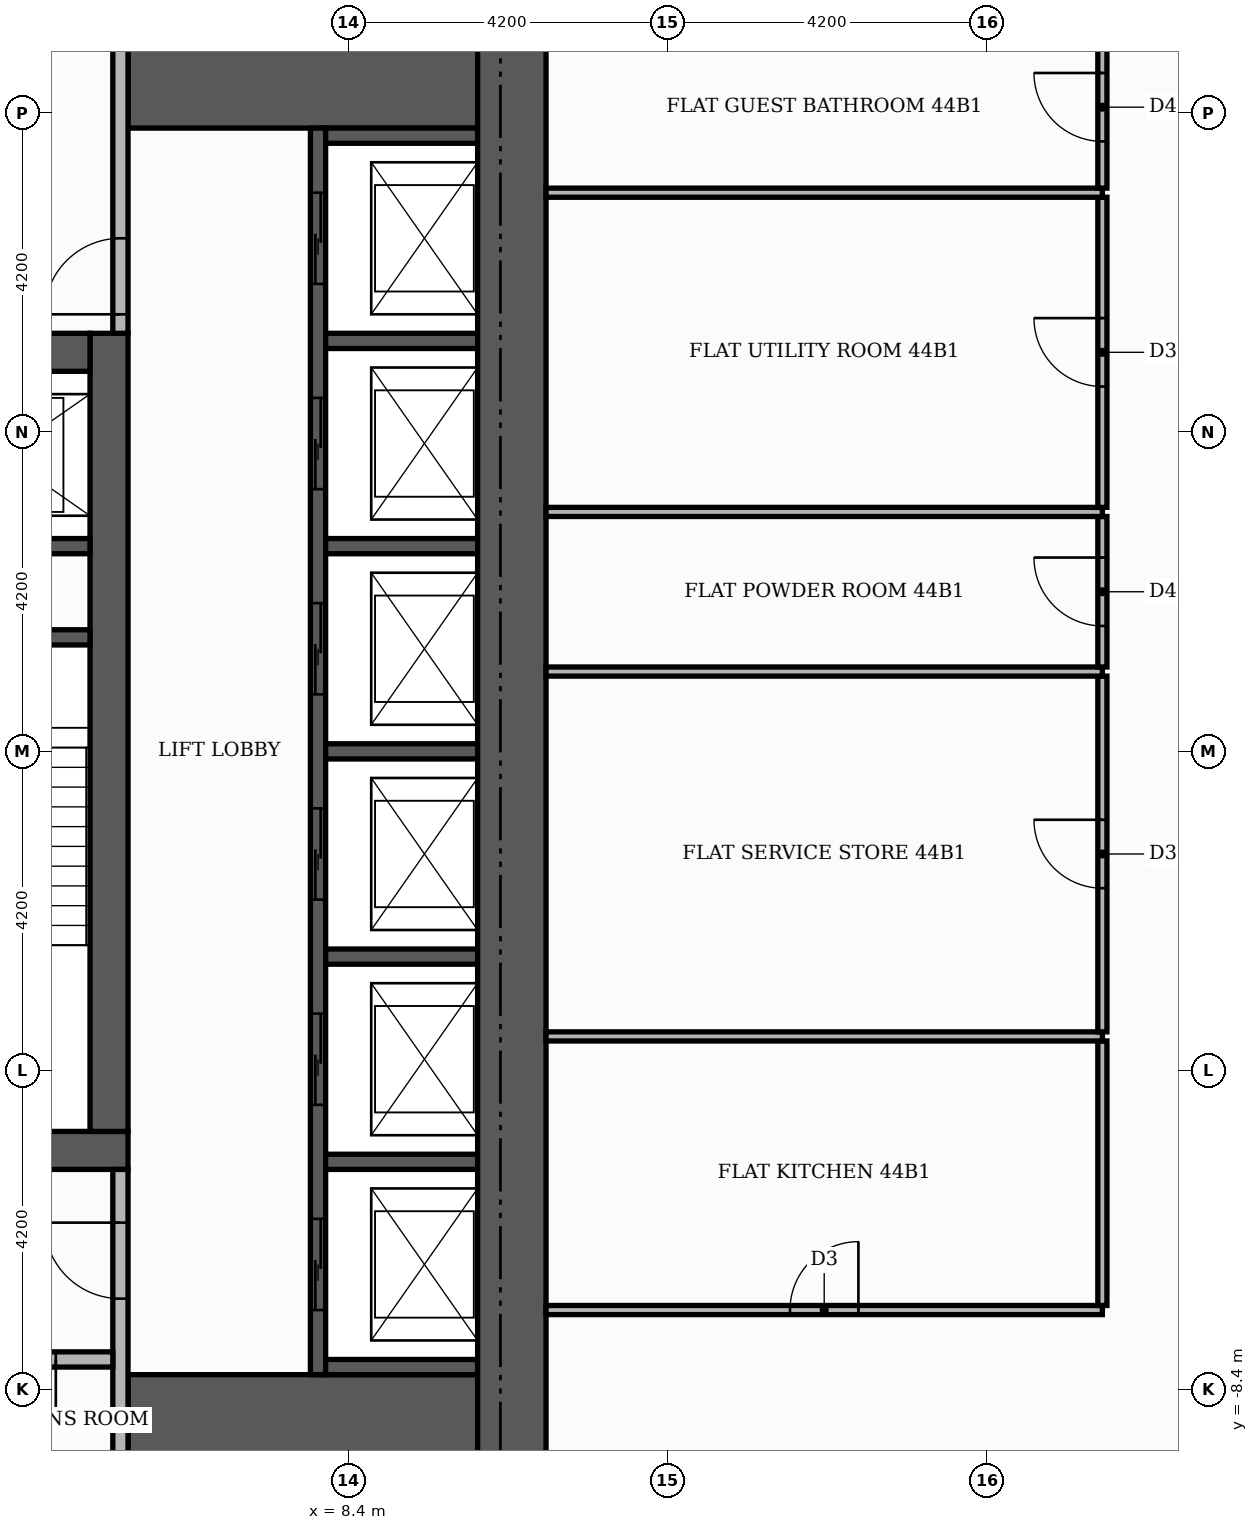
"""IFC4 building model, lengths in metres.
Left out: names, types, materials, properties, quantities, classifications, styles, units other than length and angle.
Written with IfcOpenShell. Run it as: python <this file> out.ifc"""

import sys

from ifc_helpers import new_model, si_unit, direction, frame, frame_2d, origin, place, context, subcontext, project, spatial, rectangle, extrude, element, fill, save


model = new_model("IFC4")
c1 = context("Model", 3, precision=1e-05, world=origin(), true_north=direction((0.0, 1.0)))
c2 = subcontext(c1, "Body", "Model", "MODEL_VIEW")
j1 = project(units=[si_unit("LENGTHUNIT", "METRE"), si_unit("PLANEANGLEUNIT", "RADIAN")], contexts=[c1])
p1 = place(None, origin())
s1 = spatial("IfcSite", under=j1, at=p1, CompositionType="ELEMENT")
p2 = place(p1, origin())
s2 = spatial("IfcBuilding", under=s1, at=p2, CompositionType="ELEMENT")
p3 = place(p2, frame((0.0, 0.0, 188.4)))
s3 = spatial("IfcBuildingStorey", under=s2, at=p3, CompositionType="ELEMENT", Elevation=188.4)
p4 = place(p3, frame((-5.5, -5.25, 0.0), z_axis=(0.0, 0.0, 1.0), x_axis=(1.0, 0.0, 0.0)))
e1 = element("IfcWall", 1, at=p4, inside=s3, PredefinedType="SHEAR", context=c2, shape_type="SweptSolid", body=[
    extrude(rectangle(XDim=11.0, YDim=0.5, at=frame_2d((5.5, 0.0))), origin(), (0.0, 0.0, 1.0), 3.48),
])
p5 = place(p4, frame((4.9, 0.0, 0.0)))
e2 = element("IfcOpeningElement", 2, at=p5, cuts=e1, PredefinedType="OPENING", context=c2, shape_type="SweptSolid", body=[
    extrude(rectangle(XDim=1.2, YDim=2.1, at=frame_2d((0.6, 1.05))), frame((0.0, 0.26, 0.0), z_axis=(0.0, -1.0, 0.0), x_axis=(1.0, 0.0, 0.0)), (0.0, 0.0, 1.0), 0.52),
])
p6 = place(p3, frame((5.25, -5.0, 0.0), z_axis=(0.0, 0.0, 1.0), x_axis=(0.0, 1.0, 0.0)))
e3 = element("IfcWall", 3, at=p6, inside=s3, PredefinedType="SHEAR", context=c2, shape_type="SweptSolid", body=[
    extrude(rectangle(XDim=10.5, YDim=0.5, at=frame_2d((5.25, 0.0))), origin(), (0.0, 0.0, 1.0), 3.48),
])
p7 = place(p3, frame((-5.0, 5.25, 0.0), z_axis=(0.0, 0.0, 1.0), x_axis=(1.0, 0.0, 0.0)))
e4 = element("IfcWall", 4, at=p7, inside=s3, PredefinedType="SHEAR", context=c2, shape_type="SweptSolid", body=[
    extrude(rectangle(XDim=10.0, YDim=0.5, at=frame_2d((5.0, 0.0))), origin(), (0.0, 0.0, 1.0), 3.48),
])
p8 = place(p7, frame((4.4, 0.0, 0.0)))
e5 = element("IfcOpeningElement", 5, at=p8, cuts=e4, PredefinedType="OPENING", context=c2, shape_type="SweptSolid", body=[
    extrude(rectangle(XDim=1.2, YDim=2.1, at=frame_2d((0.6, 1.05))), frame((0.0, 0.26, 0.0), z_axis=(0.0, -1.0, 0.0), x_axis=(1.0, 0.0, 0.0)), (0.0, 0.0, 1.0), 0.52),
])
for number, where, z_axis, x_axis in (
    (6, (5.5, -9.15, 0.0), (0.0, 0.0, 1.0), (1.0, 0.0, 0.0)),
    (7, (5.5, 9.15, 0.0), (0.0, 0.0, 1.0), (1.0, 0.0, 0.0)),
):
    element("IfcWall", number, at=place(p3, frame(where, z_axis=z_axis, x_axis=x_axis)), inside=s3, PredefinedType="SHEAR", context=c2, shape_type="SweptSolid", body=[
        extrude(rectangle(XDim=4.6, YDim=1.9, at=frame_2d((2.3, 0.0))), origin(), (0.0, 0.0, 1.0), 3.48),
    ])
p9 = place(p3, frame((2.15, 1.5, 0.0), z_axis=(0.0, 0.0, 1.0), x_axis=(1.0, 0.0, 0.0)))
e8 = element("IfcWall", 8, at=p9, inside=s3, PredefinedType="SHEAR", context=c2, shape_type="SweptSolid", body=[
    extrude(rectangle(XDim=2.85, YDim=0.2, at=frame_2d((1.425, 0.0))), origin(), (0.0, 0.0, 1.0), 3.48),
])
p10 = place(p3, frame((8.0, -8.2, 0.0), z_axis=(0.0, 0.0, 1.0), x_axis=(0.0, 1.0, 0.0)))
e9 = element("IfcWall", 9, at=p10, inside=s3, PredefinedType="SHEAR", context=c2, shape_type="SweptSolid", body=[
    extrude(rectangle(XDim=16.4, YDim=0.2, at=frame_2d((8.2, 0.0))), origin(), (0.0, 0.0, 1.0), 3.48),
])
p11 = place(p10, frame((0.85, 0.0, 0.0)))
e10 = element("IfcOpeningElement", 10, at=p11, cuts=e9, PredefinedType="OPENING", context=c2, shape_type="SweptSolid", body=[
    extrude(rectangle(XDim=1.2, YDim=2.1, at=frame_2d((0.6, 1.05))), frame((0.0, 0.11, 0.0), z_axis=(0.0, -1.0, 0.0), x_axis=(1.0, 0.0, 0.0)), (0.0, 0.0, 1.0), 0.22),
])
p12 = place(p10, frame((3.55, 0.0, 0.0)))
e11 = element("IfcOpeningElement", 11, at=p12, cuts=e9, PredefinedType="OPENING", context=c2, shape_type="SweptSolid", body=[
    extrude(rectangle(XDim=1.2, YDim=2.1, at=frame_2d((0.6, 1.05))), frame((0.0, 0.11, 0.0), z_axis=(0.0, -1.0, 0.0), x_axis=(1.0, 0.0, 0.0)), (0.0, 0.0, 1.0), 0.22),
])
p13 = place(p10, frame((6.25, 0.0, 0.0)))
e12 = element("IfcOpeningElement", 12, at=p13, cuts=e9, PredefinedType="OPENING", context=c2, shape_type="SweptSolid", body=[
    extrude(rectangle(XDim=1.2, YDim=2.1, at=frame_2d((0.6, 1.05))), frame((0.0, 0.11, 0.0), z_axis=(0.0, -1.0, 0.0), x_axis=(1.0, 0.0, 0.0)), (0.0, 0.0, 1.0), 0.22),
])
p14 = place(p10, frame((8.95, 0.0, 0.0)))
e13 = element("IfcOpeningElement", 13, at=p14, cuts=e9, PredefinedType="OPENING", context=c2, shape_type="SweptSolid", body=[
    extrude(rectangle(XDim=1.2, YDim=2.1, at=frame_2d((0.6, 1.05))), frame((0.0, 0.11, 0.0), z_axis=(0.0, -1.0, 0.0), x_axis=(1.0, 0.0, 0.0)), (0.0, 0.0, 1.0), 0.22),
])
p15 = place(p10, frame((11.65, 0.0, 0.0)))
e14 = element("IfcOpeningElement", 14, at=p15, cuts=e9, PredefinedType="OPENING", context=c2, shape_type="SweptSolid", body=[
    extrude(rectangle(XDim=1.2, YDim=2.1, at=frame_2d((0.6, 1.05))), frame((0.0, 0.11, 0.0), z_axis=(0.0, -1.0, 0.0), x_axis=(1.0, 0.0, 0.0)), (0.0, 0.0, 1.0), 0.22),
])
p16 = place(p10, frame((14.35, 0.0, 0.0)))
e15 = element("IfcOpeningElement", 15, at=p16, cuts=e9, PredefinedType="OPENING", context=c2, shape_type="SweptSolid", body=[
    extrude(rectangle(XDim=1.2, YDim=2.1, at=frame_2d((0.6, 1.05))), frame((0.0, 0.11, 0.0), z_axis=(0.0, -1.0, 0.0), x_axis=(1.0, 0.0, 0.0)), (0.0, 0.0, 1.0), 0.22),
])
for number, where, z_axis, x_axis in (
    (16, (8.1, -8.1, 0.0), (0.0, 0.0, 1.0), (1.0, 0.0, 0.0)),
    (17, (8.1, -5.4, 0.0), (0.0, 0.0, 1.0), (1.0, 0.0, 0.0)),
    (18, (8.1, -2.7, 0.0), (0.0, 0.0, 1.0), (1.0, 0.0, 0.0)),
    (19, (8.1, 0.0, 0.0), (0.0, 0.0, 1.0), (1.0, 0.0, 0.0)),
):
    element("IfcWall", number, at=place(p3, frame(where, z_axis=z_axis, x_axis=x_axis)), inside=s3, PredefinedType="SHEAR", context=c2, shape_type="SweptSolid", body=[
        extrude(rectangle(XDim=2.0, YDim=0.2, at=frame_2d((1.0, 0.0))), origin(), (0.0, 0.0, 1.0), 3.48),
    ])
p17 = place(p3, frame((2.15, 2.7, 0.0), z_axis=(0.0, 0.0, 1.0), x_axis=(1.0, 0.0, 0.0)))
e20 = element("IfcWall", 20, at=p17, inside=s3, PredefinedType="SHEAR", context=c2, shape_type="SweptSolid", body=[
    extrude(rectangle(XDim=2.85, YDim=0.2, at=frame_2d((1.425, 0.0))), origin(), (0.0, 0.0, 1.0), 3.48),
])
for number, where, z_axis, x_axis in (
    (21, (8.1, 2.7, 0.0), (0.0, 0.0, 1.0), (1.0, 0.0, 0.0)),
    (22, (8.1, 5.4, 0.0), (0.0, 0.0, 1.0), (1.0, 0.0, 0.0)),
    (23, (8.1, 8.1, 0.0), (0.0, 0.0, 1.0), (1.0, 0.0, 0.0)),
):
    element("IfcWall", number, at=place(p3, frame(where, z_axis=z_axis, x_axis=x_axis)), inside=s3, PredefinedType="SHEAR", context=c2, shape_type="SweptSolid", body=[
        extrude(rectangle(XDim=2.0, YDim=0.2, at=frame_2d((1.0, 0.0))), origin(), (0.0, 0.0, 1.0), 3.48),
    ])
p18 = place(p3, frame((10.55, -10.1, 0.0), z_axis=(0.0, 0.0, 1.0), x_axis=(0.0, 1.0, 0.0)))
e24 = element("IfcWall", 24, at=p18, inside=s3, PredefinedType="SHEAR", context=c2, shape_type="SweptSolid", body=[
    extrude(rectangle(XDim=20.2, YDim=0.9, at=frame_2d((10.1, 0.0))), origin(), (0.0, 0.0, 1.0), 3.48),
])
p19 = place(p3, frame((5.4, -10.1, 0.0), z_axis=(0.0, 0.0, 1.0), x_axis=(0.0, 1.0, 0.0)))
e25 = element("IfcWall", 25, at=p19, inside=s3, PredefinedType="PARTITIONING", context=c2, shape_type="SweptSolid", body=[
    extrude(rectangle(XDim=4.6, YDim=0.2, at=frame_2d((2.3, 0.0))), origin(), (0.0, 0.0, 1.0), 3.48),
])
p20 = place(p19, frame((2.9, 0.0, 0.0)))
e26 = element("IfcOpeningElement", 26, at=p20, cuts=e25, PredefinedType="OPENING", context=c2, shape_type="SweptSolid", body=[
    extrude(rectangle(XDim=1.0, YDim=2.1, at=frame_2d((0.5, 1.05))), frame((0.0, 0.11, 0.0), z_axis=(0.0, -1.0, 0.0), x_axis=(1.0, 0.0, 0.0)), (0.0, 0.0, 1.0), 0.22),
])
p21 = place(p3, frame((2.95, -8.0, 0.0), z_axis=(0.0, 0.0, 1.0), x_axis=(1.0, 0.0, 0.0)))
e27 = element("IfcWall", 27, at=p21, inside=s3, PredefinedType="PARTITIONING", context=c2, shape_type="SweptSolid", body=[
    extrude(rectangle(XDim=2.35, YDim=0.2, at=frame_2d((1.175, 0.0))), origin(), (0.0, 0.0, 1.0), 3.48),
])
p22 = place(p21, frame((0.7, 0.0, 0.0)))
e28 = element("IfcOpeningElement", 28, at=p22, cuts=e27, PredefinedType="OPENING", context=c2, shape_type="SweptSolid", body=[
    extrude(rectangle(XDim=0.9, YDim=2.1, at=frame_2d((0.45, 1.05))), frame((0.0, 0.11, 0.0), z_axis=(0.0, -1.0, 0.0), x_axis=(1.0, 0.0, 0.0)), (0.0, 0.0, 1.0), 0.22),
])
p23 = place(p3, frame((5.4, 5.5, 0.0), z_axis=(0.0, 0.0, 1.0), x_axis=(0.0, 1.0, 0.0)))
e29 = element("IfcWall", 29, at=p23, inside=s3, PredefinedType="PARTITIONING", context=c2, shape_type="SweptSolid", body=[
    extrude(rectangle(XDim=4.6, YDim=0.2, at=frame_2d((2.3, 0.0))), origin(), (0.0, 0.0, 1.0), 3.48),
])
p24 = place(p23, frame((0.25, 0.0, 0.0)))
e30 = element("IfcOpeningElement", 30, at=p24, cuts=e29, PredefinedType="OPENING", context=c2, shape_type="SweptSolid", body=[
    extrude(rectangle(XDim=1.0, YDim=2.1, at=frame_2d((0.5, 1.05))), frame((0.0, 0.11, 0.0), z_axis=(0.0, -1.0, 0.0), x_axis=(1.0, 0.0, 0.0)), (0.0, 0.0, 1.0), 0.22),
])
p25 = place(p3, frame((11.0, -7.35, 0.0), z_axis=(0.0, 0.0, 1.0), x_axis=(1.0, 0.0, 0.0)))
e31 = element("IfcWall", 31, at=p25, inside=s3, PredefinedType="PARTITIONING", context=c2, shape_type="SweptSolid", body=[
    extrude(rectangle(XDim=7.32, YDim=0.12, at=frame_2d((3.66, 0.0))), origin(), (0.0, 0.0, 1.0), 3.48),
])
p26 = place(p25, frame((3.21, 0.0, 0.0)))
e32 = element("IfcOpeningElement", 32, at=p26, cuts=e31, PredefinedType="OPENING", context=c2, shape_type="SweptSolid", body=[
    extrude(rectangle(XDim=0.9, YDim=2.1, at=frame_2d((0.45, 1.05))), frame((0.0, 0.07, 0.0), z_axis=(0.0, -1.0, 0.0), x_axis=(1.0, 0.0, 0.0)), (0.0, 0.0, 1.0), 0.14),
])
p27 = place(p3, frame((18.32, -7.29, 0.0), z_axis=(0.0, 0.0, 1.0), x_axis=(0.0, 1.0, 0.0)))
e33 = element("IfcWall", 33, at=p27, inside=s3, PredefinedType="PARTITIONING", context=c2, shape_type="SweptSolid", body=[
    extrude(rectangle(XDim=3.48, YDim=0.12, at=frame_2d((1.74, 0.0))), origin(), (0.0, 0.0, 1.0), 3.48),
])
p28 = place(p3, frame((11.0, -3.75, 0.0), z_axis=(0.0, 0.0, 1.0), x_axis=(1.0, 0.0, 0.0)))
e34 = element("IfcWall", 34, at=p28, inside=s3, PredefinedType="PARTITIONING", context=c2, shape_type="SweptSolid", body=[
    extrude(rectangle(XDim=7.32, YDim=0.12, at=frame_2d((3.66, 0.0))), origin(), (0.0, 0.0, 1.0), 3.48),
])
p29 = place(p3, frame((18.32, -3.69, 0.0), z_axis=(0.0, 0.0, 1.0), x_axis=(0.0, 1.0, 0.0)))
e35 = element("IfcWall", 35, at=p29, inside=s3, PredefinedType="PARTITIONING", context=c2, shape_type="SweptSolid", body=[
    extrude(rectangle(XDim=4.68, YDim=0.12, at=frame_2d((2.34, 0.0))), origin(), (0.0, 0.0, 1.0), 3.48),
])
p30 = place(p29, frame((1.89, 0.0, 0.0)))
e36 = element("IfcOpeningElement", 36, at=p30, cuts=e35, PredefinedType="OPENING", context=c2, shape_type="SweptSolid", body=[
    extrude(rectangle(XDim=0.9, YDim=2.1, at=frame_2d((0.45, 1.05))), frame((0.0, 0.07, 0.0), z_axis=(0.0, -1.0, 0.0), x_axis=(1.0, 0.0, 0.0)), (0.0, 0.0, 1.0), 0.14),
])
p31 = place(p3, frame((11.0, 1.05, 0.0), z_axis=(0.0, 0.0, 1.0), x_axis=(1.0, 0.0, 0.0)))
e37 = element("IfcWall", 37, at=p31, inside=s3, PredefinedType="PARTITIONING", context=c2, shape_type="SweptSolid", body=[
    extrude(rectangle(XDim=7.32, YDim=0.12, at=frame_2d((3.66, 0.0))), origin(), (0.0, 0.0, 1.0), 3.48),
])
p32 = place(p3, frame((18.32, 1.11, 0.0), z_axis=(0.0, 0.0, 1.0), x_axis=(0.0, 1.0, 0.0)))
e38 = element("IfcWall", 38, at=p32, inside=s3, PredefinedType="PARTITIONING", context=c2, shape_type="SweptSolid", body=[
    extrude(rectangle(XDim=1.98, YDim=0.12, at=frame_2d((0.99, 0.0))), origin(), (0.0, 0.0, 1.0), 3.48),
])
p33 = place(p32, frame((0.54, 0.0, 0.0)))
e39 = element("IfcOpeningElement", 39, at=p33, cuts=e38, PredefinedType="OPENING", context=c2, shape_type="SweptSolid", body=[
    extrude(rectangle(XDim=0.9, YDim=2.1, at=frame_2d((0.45, 1.05))), frame((0.0, 0.07, 0.0), z_axis=(0.0, -1.0, 0.0), x_axis=(1.0, 0.0, 0.0)), (0.0, 0.0, 1.0), 0.14),
])
p34 = place(p3, frame((11.0, 3.15, 0.0), z_axis=(0.0, 0.0, 1.0), x_axis=(1.0, 0.0, 0.0)))
e40 = element("IfcWall", 40, at=p34, inside=s3, PredefinedType="PARTITIONING", context=c2, shape_type="SweptSolid", body=[
    extrude(rectangle(XDim=7.32, YDim=0.12, at=frame_2d((3.66, 0.0))), origin(), (0.0, 0.0, 1.0), 3.48),
])
p35 = place(p3, frame((18.32, 3.21, 0.0), z_axis=(0.0, 0.0, 1.0), x_axis=(0.0, 1.0, 0.0)))
e41 = element("IfcWall", 41, at=p35, inside=s3, PredefinedType="PARTITIONING", context=c2, shape_type="SweptSolid", body=[
    extrude(rectangle(XDim=4.08, YDim=0.12, at=frame_2d((2.04, 0.0))), origin(), (0.0, 0.0, 1.0), 3.48),
])
p36 = place(p35, frame((1.59, 0.0, 0.0)))
e42 = element("IfcOpeningElement", 42, at=p36, cuts=e41, PredefinedType="OPENING", context=c2, shape_type="SweptSolid", body=[
    extrude(rectangle(XDim=0.9, YDim=2.1, at=frame_2d((0.45, 1.05))), frame((0.0, 0.07, 0.0), z_axis=(0.0, -1.0, 0.0), x_axis=(1.0, 0.0, 0.0)), (0.0, 0.0, 1.0), 0.14),
])
p37 = place(p3, frame((11.0, 7.35, 0.0), z_axis=(0.0, 0.0, 1.0), x_axis=(1.0, 0.0, 0.0)))
e43 = element("IfcWall", 43, at=p37, inside=s3, PredefinedType="PARTITIONING", context=c2, shape_type="SweptSolid", body=[
    extrude(rectangle(XDim=7.32, YDim=0.12, at=frame_2d((3.66, 0.0))), origin(), (0.0, 0.0, 1.0), 3.48),
])
p38 = place(p3, frame((18.32, 7.41, 0.0), z_axis=(0.0, 0.0, 1.0), x_axis=(0.0, 1.0, 0.0)))
e44 = element("IfcWall", 44, at=p38, inside=s3, PredefinedType="PARTITIONING", context=c2, shape_type="SweptSolid", body=[
    extrude(rectangle(XDim=2.13, YDim=0.12, at=frame_2d((1.065, 0.0))), origin(), (0.0, 0.0, 1.0), 3.48),
])
p39 = place(p38, frame((0.615, 0.0, 0.0)))
e45 = element("IfcOpeningElement", 45, at=p39, cuts=e44, PredefinedType="OPENING", context=c2, shape_type="SweptSolid", body=[
    extrude(rectangle(XDim=0.9, YDim=2.1, at=frame_2d((0.45, 1.05))), frame((0.0, 0.07, 0.0), z_axis=(0.0, -1.0, 0.0), x_axis=(1.0, 0.0, 0.0)), (0.0, 0.0, 1.0), 0.14),
])
p40 = place(p11, origin())
e46 = element("IfcDoor", 46, at=p40, inside=s3, OperationType="SLIDING_TO_LEFT", PredefinedType="DOOR", context=c2, shape_type="SweptSolid", body=[
    extrude(rectangle(XDim=1.2, YDim=2.1, at=frame_2d((0.6, 1.05))), frame((0.0, 0.025, 0.0), z_axis=(0.0, -1.0, 0.0), x_axis=(1.0, 0.0, 0.0)), (0.0, 0.0, 1.0), 0.05),
])
fill(e10, e46)
p41 = place(p12, origin())
e47 = element("IfcDoor", 47, at=p41, inside=s3, OperationType="SLIDING_TO_LEFT", PredefinedType="DOOR", context=c2, shape_type="SweptSolid", body=[
    extrude(rectangle(XDim=1.2, YDim=2.1, at=frame_2d((0.6, 1.05))), frame((0.0, 0.025, 0.0), z_axis=(0.0, -1.0, 0.0), x_axis=(1.0, 0.0, 0.0)), (0.0, 0.0, 1.0), 0.05),
])
fill(e11, e47)
p42 = place(p13, origin())
e48 = element("IfcDoor", 48, at=p42, inside=s3, OperationType="SLIDING_TO_LEFT", PredefinedType="DOOR", context=c2, shape_type="SweptSolid", body=[
    extrude(rectangle(XDim=1.2, YDim=2.1, at=frame_2d((0.6, 1.05))), frame((0.0, 0.025, 0.0), z_axis=(0.0, -1.0, 0.0), x_axis=(1.0, 0.0, 0.0)), (0.0, 0.0, 1.0), 0.05),
])
fill(e12, e48)
p43 = place(p14, origin())
e49 = element("IfcDoor", 49, at=p43, inside=s3, OperationType="SLIDING_TO_LEFT", PredefinedType="DOOR", context=c2, shape_type="SweptSolid", body=[
    extrude(rectangle(XDim=1.2, YDim=2.1, at=frame_2d((0.6, 1.05))), frame((0.0, 0.025, 0.0), z_axis=(0.0, -1.0, 0.0), x_axis=(1.0, 0.0, 0.0)), (0.0, 0.0, 1.0), 0.05),
])
fill(e13, e49)
p44 = place(p15, origin())
e50 = element("IfcDoor", 50, at=p44, inside=s3, OperationType="SLIDING_TO_LEFT", PredefinedType="DOOR", context=c2, shape_type="SweptSolid", body=[
    extrude(rectangle(XDim=1.2, YDim=2.1, at=frame_2d((0.6, 1.05))), frame((0.0, 0.025, 0.0), z_axis=(0.0, -1.0, 0.0), x_axis=(1.0, 0.0, 0.0)), (0.0, 0.0, 1.0), 0.05),
])
fill(e14, e50)
p45 = place(p16, origin())
e51 = element("IfcDoor", 51, at=p45, inside=s3, OperationType="SLIDING_TO_LEFT", PredefinedType="DOOR", context=c2, shape_type="SweptSolid", body=[
    extrude(rectangle(XDim=1.2, YDim=2.1, at=frame_2d((0.6, 1.05))), frame((0.0, 0.025, 0.0), z_axis=(0.0, -1.0, 0.0), x_axis=(1.0, 0.0, 0.0)), (0.0, 0.0, 1.0), 0.05),
])
fill(e15, e51)
p46 = place(p24, origin())
e52 = element("IfcDoor", 52, at=p46, inside=s3, OperationType="SINGLE_SWING_LEFT", PredefinedType="DOOR", context=c2, shape_type="SweptSolid", body=[
    extrude(rectangle(XDim=1.0, YDim=2.1, at=frame_2d((0.5, 1.05))), frame((0.0, 0.025, 0.0), z_axis=(0.0, -1.0, 0.0), x_axis=(1.0, 0.0, 0.0)), (0.0, 0.0, 1.0), 0.05),
])
fill(e30, e52)
p47 = place(p20, origin())
e53 = element("IfcDoor", 53, at=p47, inside=s3, OperationType="SINGLE_SWING_RIGHT", PredefinedType="DOOR", context=c2, shape_type="SweptSolid", body=[
    extrude(rectangle(XDim=1.0, YDim=2.1, at=frame_2d((0.5, 1.05))), frame((0.0, 0.025, 0.0), z_axis=(0.0, -1.0, 0.0), x_axis=(1.0, 0.0, 0.0)), (0.0, 0.0, 1.0), 0.05),
])
fill(e26, e53)
p48 = place(p22, frame((0.9, 0.0, 0.0), z_axis=(0.0, 0.0, 1.0), x_axis=(-1.0, 0.0, 0.0)))
e54 = element("IfcDoor", 54, at=p48, inside=s3, OperationType="SINGLE_SWING_RIGHT", PredefinedType="DOOR", context=c2, shape_type="SweptSolid", body=[
    extrude(rectangle(XDim=0.9, YDim=2.1, at=frame_2d((0.45, 1.05))), frame((0.0, 0.025, 0.0), z_axis=(0.0, -1.0, 0.0), x_axis=(1.0, 0.0, 0.0)), (0.0, 0.0, 1.0), 0.05),
])
fill(e28, e54)
p49 = place(p26, origin())
e55 = element("IfcDoor", 55, at=p49, inside=s3, OperationType="SINGLE_SWING_RIGHT", PredefinedType="DOOR", context=c2, shape_type="SweptSolid", body=[
    extrude(rectangle(XDim=0.9, YDim=2.1, at=frame_2d((0.45, 1.05))), frame((0.0, 0.025, 0.0), z_axis=(0.0, -1.0, 0.0), x_axis=(1.0, 0.0, 0.0)), (0.0, 0.0, 1.0), 0.05),
])
fill(e32, e55)
p50 = place(p30, origin())
e56 = element("IfcDoor", 56, at=p50, inside=s3, OperationType="SINGLE_SWING_RIGHT", PredefinedType="DOOR", context=c2, shape_type="SweptSolid", body=[
    extrude(rectangle(XDim=0.9, YDim=2.1, at=frame_2d((0.45, 1.05))), frame((0.0, 0.025, 0.0), z_axis=(0.0, -1.0, 0.0), x_axis=(1.0, 0.0, 0.0)), (0.0, 0.0, 1.0), 0.05),
])
fill(e36, e56)
p51 = place(p33, origin())
e57 = element("IfcDoor", 57, at=p51, inside=s3, OperationType="SINGLE_SWING_RIGHT", PredefinedType="DOOR", context=c2, shape_type="SweptSolid", body=[
    extrude(rectangle(XDim=0.9, YDim=2.1, at=frame_2d((0.45, 1.05))), frame((0.0, 0.025, 0.0), z_axis=(0.0, -1.0, 0.0), x_axis=(1.0, 0.0, 0.0)), (0.0, 0.0, 1.0), 0.05),
])
fill(e39, e57)
p52 = place(p36, origin())
e58 = element("IfcDoor", 58, at=p52, inside=s3, OperationType="SINGLE_SWING_RIGHT", PredefinedType="DOOR", context=c2, shape_type="SweptSolid", body=[
    extrude(rectangle(XDim=0.9, YDim=2.1, at=frame_2d((0.45, 1.05))), frame((0.0, 0.025, 0.0), z_axis=(0.0, -1.0, 0.0), x_axis=(1.0, 0.0, 0.0)), (0.0, 0.0, 1.0), 0.05),
])
fill(e42, e58)
p53 = place(p39, origin())
e59 = element("IfcDoor", 59, at=p53, inside=s3, OperationType="SINGLE_SWING_RIGHT", PredefinedType="DOOR", context=c2, shape_type="SweptSolid", body=[
    extrude(rectangle(XDim=0.9, YDim=2.1, at=frame_2d((0.45, 1.05))), frame((0.0, 0.025, 0.0), z_axis=(0.0, -1.0, 0.0), x_axis=(1.0, 0.0, 0.0)), (0.0, 0.0, 1.0), 0.05),
])
fill(e45, e59)
save(model, sys.argv[1])
